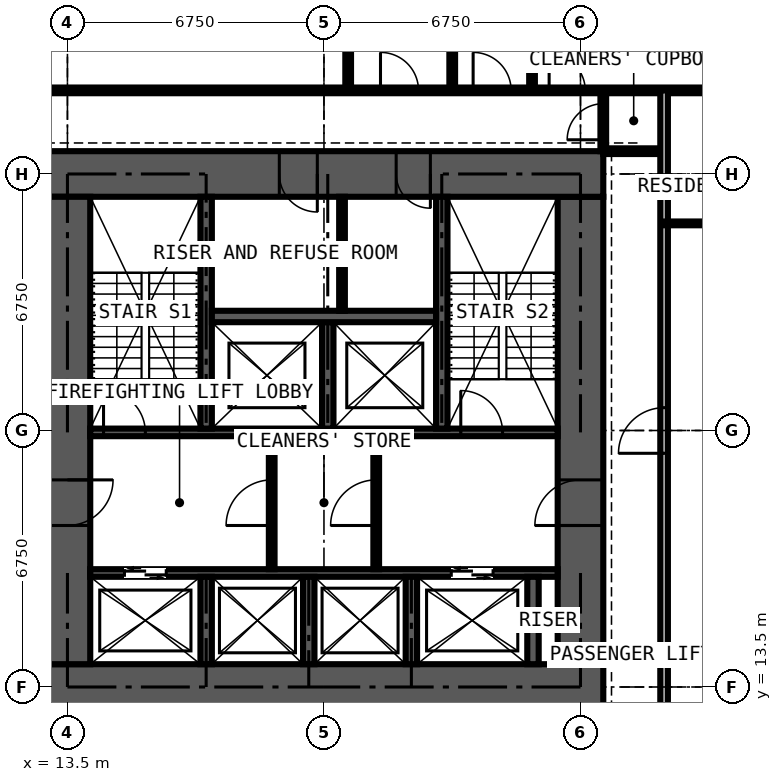
"""IFC4 building model, lengths in metres.
Left out: names, types, materials, properties, quantities, classifications, styles, units other than length and angle.
Written with IfcOpenShell. Run it as: python <this file> out.ifc"""

import sys

from ifc_helpers import new_model, si_unit, direction, frame, frame_2d, origin, place, context, subcontext, project, spatial, rectangle, extrude, element, fill, save


model = new_model("IFC4")
c1 = context("Model", 3, precision=1e-05, world=origin(), true_north=direction((0.0, 1.0)))
c2 = subcontext(c1, "Body", "Model", "MODEL_VIEW")
j1 = project(units=[si_unit("LENGTHUNIT", "METRE"), si_unit("PLANEANGLEUNIT", "RADIAN")], contexts=[c1])
p1 = place(None, origin())
s1 = spatial("IfcSite", under=j1, at=p1, CompositionType="ELEMENT")
p2 = place(p1, origin())
s2 = spatial("IfcBuilding", under=s1, at=p2, CompositionType="ELEMENT")
p3 = place(p2, frame((0.0, 0.0, 54.0)))
s3 = spatial("IfcBuildingStorey", under=s2, at=p3, CompositionType="ELEMENT", Elevation=54.0)
p4 = place(p3, frame((12.9, 13.5, 0.0), z_axis=(0.0, 0.0, 1.0), x_axis=(1.0, 0.0, 0.0)))
e1 = element("IfcWall", 1, at=p4, inside=s3, PredefinedType="SHEAR", context=c2, shape_type="SweptSolid", body=[
    extrude(rectangle(XDim=14.7, YDim=1.2, at=frame_2d((7.35, 0.0))), origin(), (0.0, 0.0, 1.0), 3.6),
])
p5 = place(p3, frame((27.0, 14.1, 0.0), z_axis=(0.0, 0.0, 1.0), x_axis=(0.0, 1.0, 0.0)))
e2 = element("IfcWall", 2, at=p5, inside=s3, PredefinedType="SHEAR", context=c2, shape_type="SweptSolid", body=[
    extrude(rectangle(XDim=12.3, YDim=1.2, at=frame_2d((6.15, 0.0))), origin(), (0.0, 0.0, 1.0), 3.6),
])
p6 = place(p5, frame((3.65, 0.0, 0.0)))
e3 = element("IfcOpeningElement", 3, at=p6, cuts=e2, PredefinedType="OPENING", context=c2, shape_type="SweptSolid", body=[
    extrude(rectangle(XDim=1.2, YDim=2.2, at=frame_2d((0.6, 1.1))), frame((0.0, 0.61, 0.0), z_axis=(0.0, -1.0, 0.0), x_axis=(1.0, 0.0, 0.0)), (0.0, 0.0, 1.0), 1.22),
])
p7 = place(p3, frame((27.6, 27.0, 0.0), z_axis=(0.0, 0.0, 1.0), x_axis=(-1.0, 0.0, 0.0)))
e4 = element("IfcWall", 4, at=p7, inside=s3, PredefinedType="SHEAR", context=c2, shape_type="SweptSolid", body=[
    extrude(rectangle(XDim=14.7, YDim=1.2, at=frame_2d((7.35, 0.0))), origin(), (0.0, 0.0, 1.0), 3.6),
])
p8 = place(p7, frame((4.55, 0.0, 0.0)))
e5 = element("IfcOpeningElement", 5, at=p8, cuts=e4, PredefinedType="OPENING", context=c2, shape_type="SweptSolid", body=[
    extrude(rectangle(XDim=0.9, YDim=2.2, at=frame_2d((0.45, 1.1))), frame((0.0, 0.61, 0.0), z_axis=(0.0, -1.0, 0.0), x_axis=(1.0, 0.0, 0.0)), (0.0, 0.0, 1.0), 1.22),
])
p9 = place(p7, frame((7.525, 0.0, 0.0)))
e6 = element("IfcOpeningElement", 6, at=p9, cuts=e4, PredefinedType="OPENING", context=c2, shape_type="SweptSolid", body=[
    extrude(rectangle(XDim=1.0, YDim=2.2, at=frame_2d((0.5, 1.1))), frame((0.0, 0.61, 0.0), z_axis=(0.0, -1.0, 0.0), x_axis=(1.0, 0.0, 0.0)), (0.0, 0.0, 1.0), 1.22),
])
p10 = place(p3, frame((13.5, 26.4, 0.0), z_axis=(0.0, 0.0, 1.0), x_axis=(0.0, -1.0, 0.0)))
e7 = element("IfcWall", 7, at=p10, inside=s3, PredefinedType="SHEAR", context=c2, shape_type="SweptSolid", body=[
    extrude(rectangle(XDim=12.3, YDim=1.2, at=frame_2d((6.15, 0.0))), origin(), (0.0, 0.0, 1.0), 3.6),
])
p11 = place(p10, frame((7.45, 0.0, 0.0)))
e8 = element("IfcOpeningElement", 8, at=p11, cuts=e7, PredefinedType="OPENING", context=c2, shape_type="SweptSolid", body=[
    extrude(rectangle(XDim=1.2, YDim=2.2, at=frame_2d((0.6, 1.1))), frame((0.0, 0.61, 0.0), z_axis=(0.0, -1.0, 0.0), x_axis=(1.0, 0.0, 0.0)), (0.0, 0.0, 1.0), 1.22),
])
p12 = place(p3, frame((14.1, 16.5, 0.0), z_axis=(0.0, 0.0, 1.0), x_axis=(1.0, 0.0, 0.0)))
e9 = element("IfcWall", 9, at=p12, inside=s3, PredefinedType="SHEAR", context=c2, shape_type="SweptSolid", body=[
    extrude(rectangle(XDim=12.3, YDim=0.2, at=frame_2d((6.15, 0.0))), origin(), (0.0, 0.0, 1.0), 3.6),
])
p13 = place(p12, frame((0.9, 0.0, 0.0)))
e10 = element("IfcOpeningElement", 10, at=p13, cuts=e9, PredefinedType="OPENING", context=c2, shape_type="SweptSolid", body=[
    extrude(rectangle(XDim=1.1, YDim=2.2, at=frame_2d((0.55, 1.1))), frame((0.0, 0.11, 0.0), z_axis=(0.0, -1.0, 0.0), x_axis=(1.0, 0.0, 0.0)), (0.0, 0.0, 1.0), 0.22),
])
p14 = place(p12, frame((9.5, 0.0, 0.0)))
e11 = element("IfcOpeningElement", 11, at=p14, cuts=e9, PredefinedType="OPENING", context=c2, shape_type="SweptSolid", body=[
    extrude(rectangle(XDim=1.1, YDim=2.2, at=frame_2d((0.55, 1.1))), frame((0.0, 0.11, 0.0), z_axis=(0.0, -1.0, 0.0), x_axis=(1.0, 0.0, 0.0)), (0.0, 0.0, 1.0), 0.22),
])
p15 = place(p3, frame((14.1, 20.2, 0.0), z_axis=(0.0, 0.0, 1.0), x_axis=(1.0, 0.0, 0.0)))
e12 = element("IfcWall", 12, at=p15, inside=s3, PredefinedType="SHEAR", context=c2, shape_type="SweptSolid", body=[
    extrude(rectangle(XDim=12.3, YDim=0.2, at=frame_2d((6.15, 0.0))), origin(), (0.0, 0.0, 1.0), 3.6),
])
p16 = place(p15, frame((0.35, 0.0, 0.0)))
e13 = element("IfcOpeningElement", 13, at=p16, cuts=e12, PredefinedType="OPENING", context=c2, shape_type="SweptSolid", body=[
    extrude(rectangle(XDim=1.1, YDim=2.2, at=frame_2d((0.55, 1.1))), frame((0.0, 0.11, 0.0), z_axis=(0.0, -1.0, 0.0), x_axis=(1.0, 0.0, 0.0)), (0.0, 0.0, 1.0), 0.22),
])
p17 = place(p15, frame((9.75, 0.0, 0.0)))
e14 = element("IfcOpeningElement", 14, at=p17, cuts=e12, PredefinedType="OPENING", context=c2, shape_type="SweptSolid", body=[
    extrude(rectangle(XDim=1.1, YDim=2.2, at=frame_2d((0.55, 1.1))), frame((0.0, 0.11, 0.0), z_axis=(0.0, -1.0, 0.0), x_axis=(1.0, 0.0, 0.0)), (0.0, 0.0, 1.0), 0.22),
])
for number, where, z_axis, x_axis in (
    (15, (17.15, 20.3, 0.0), (0.0, 0.0, 1.0), (0.0, 1.0, 0.0)),
    (16, (23.35, 20.3, 0.0), (0.0, 0.0, 1.0), (0.0, 1.0, 0.0)),
):
    element("IfcWall", number, at=place(p3, frame(where, z_axis=z_axis, x_axis=x_axis)), inside=s3, PredefinedType="SHEAR", context=c2, shape_type="SweptSolid", body=[
        extrude(rectangle(XDim=6.1, YDim=0.3, at=frame_2d((3.05, 0.0))), origin(), (0.0, 0.0, 1.0), 3.6),
    ])
p18 = place(p3, frame((20.35, 20.3, 0.0), z_axis=(0.0, 0.0, 1.0), x_axis=(0.0, 1.0, 0.0)))
e17 = element("IfcWall", 17, at=p18, inside=s3, PredefinedType="SHEAR", context=c2, shape_type="SweptSolid", body=[
    extrude(rectangle(XDim=2.8, YDim=0.3, at=frame_2d((1.4, 0.0))), origin(), (0.0, 0.0, 1.0), 3.6),
])
p19 = place(p3, frame((17.3, 23.25, 0.0), z_axis=(0.0, 0.0, 1.0), x_axis=(1.0, 0.0, 0.0)))
e18 = element("IfcWall", 18, at=p19, inside=s3, PredefinedType="SHEAR", context=c2, shape_type="SweptSolid", body=[
    extrude(rectangle(XDim=5.9, YDim=0.3, at=frame_2d((2.95, 0.0))), origin(), (0.0, 0.0, 1.0), 3.6),
])
for number, where, z_axis, x_axis in (
    (19, (17.15, 14.1, 0.0), (0.0, 0.0, 1.0), (0.0, 1.0, 0.0)),
    (20, (19.85, 14.1, 0.0), (0.0, 0.0, 1.0), (0.0, 1.0, 0.0)),
    (21, (22.55, 14.1, 0.0), (0.0, 0.0, 1.0), (0.0, 1.0, 0.0)),
    (22, (25.75, 14.1, 0.0), (0.0, 0.0, 1.0), (0.0, 1.0, 0.0)),
):
    element("IfcWall", number, at=place(p3, frame(where, z_axis=z_axis, x_axis=x_axis)), inside=s3, PredefinedType="SHEAR", context=c2, shape_type="SweptSolid", body=[
        extrude(rectangle(XDim=2.3, YDim=0.3, at=frame_2d((1.15, 0.0))), origin(), (0.0, 0.0, 1.0), 3.6),
    ])
p20 = place(p3, frame((18.875, 16.6, 0.0), z_axis=(0.0, 0.0, 1.0), x_axis=(0.0, 1.0, 0.0)))
e23 = element("IfcWall", 23, at=p20, inside=s3, PredefinedType="PARTITIONING", context=c2, shape_type="SweptSolid", body=[
    extrude(rectangle(XDim=3.5, YDim=0.15, at=frame_2d((1.75, 0.0))), origin(), (0.0, 0.0, 1.0), 3.375),
])
p21 = place(p20, frame((1.15, 0.0, 0.0)))
e24 = element("IfcOpeningElement", 24, at=p21, cuts=e23, PredefinedType="OPENING", context=c2, shape_type="SweptSolid", body=[
    extrude(rectangle(XDim=1.2, YDim=2.2, at=frame_2d((0.6, 1.1))), frame((0.0, 0.085, 0.0), z_axis=(0.0, -1.0, 0.0), x_axis=(1.0, 0.0, 0.0)), (0.0, 0.0, 1.0), 0.17),
])
p22 = place(p3, frame((21.625, 16.6, 0.0), z_axis=(0.0, 0.0, 1.0), x_axis=(0.0, 1.0, 0.0)))
e25 = element("IfcWall", 25, at=p22, inside=s3, PredefinedType="PARTITIONING", context=c2, shape_type="SweptSolid", body=[
    extrude(rectangle(XDim=3.5, YDim=0.15, at=frame_2d((1.75, 0.0))), origin(), (0.0, 0.0, 1.0), 3.375),
])
p23 = place(p22, frame((1.15, 0.0, 0.0)))
e26 = element("IfcOpeningElement", 26, at=p23, cuts=e25, PredefinedType="OPENING", context=c2, shape_type="SweptSolid", body=[
    extrude(rectangle(XDim=1.2, YDim=2.2, at=frame_2d((0.6, 1.1))), frame((0.0, 0.085, 0.0), z_axis=(0.0, -1.0, 0.0), x_axis=(1.0, 0.0, 0.0)), (0.0, 0.0, 1.0), 0.17),
])
p24 = place(p3, frame((20.725, 23.4, 0.0), z_axis=(0.0, 0.0, 1.0), x_axis=(0.0, 1.0, 0.0)))
e27 = element("IfcWall", 27, at=p24, inside=s3, PredefinedType="PARTITIONING", context=c2, shape_type="SweptSolid", body=[
    extrude(rectangle(XDim=3.0, YDim=0.15, at=frame_2d((1.5, 0.0))), origin(), (0.0, 0.0, 1.0), 3.375),
])
p25 = place(p3, frame((11.3, 29.2, 0.0), z_axis=(0.0, 0.0, 1.0), x_axis=(1.0, 0.0, 0.0)))
e28 = element("IfcWall", 28, at=p25, inside=s3, PredefinedType="PARTITIONING", context=c2, shape_type="SweptSolid", body=[
    extrude(rectangle(XDim=19.075, YDim=0.15, at=frame_2d((9.538, 0.0))), origin(), (0.0, 0.0, 1.0), 3.375),
])
p26 = place(p25, frame((12.875, 0.0, 0.0)))
e29 = element("IfcOpeningElement", 29, at=p26, cuts=e28, PredefinedType="OPENING", context=c2, shape_type="SweptSolid", body=[
    extrude(rectangle(XDim=1.0, YDim=2.2, at=frame_2d((0.5, 1.1))), frame((0.0, 0.085, 0.0), z_axis=(0.0, -1.0, 0.0), x_axis=(1.0, 0.0, 0.0)), (0.0, 0.0, 1.0), 0.17),
])
p27 = place(p25, frame((10.438, 0.0, 0.0)))
e30 = element("IfcOpeningElement", 30, at=p27, cuts=e28, PredefinedType="OPENING", context=c2, shape_type="SweptSolid", body=[
    extrude(rectangle(XDim=1.0, YDim=2.2, at=frame_2d((0.5, 1.1))), frame((0.0, 0.085, 0.0), z_axis=(0.0, -1.0, 0.0), x_axis=(1.0, 0.0, 0.0)), (0.0, 0.0, 1.0), 0.17),
])
p28 = place(p25, frame((14.875, 0.0, 0.0)))
e31 = element("IfcOpeningElement", 31, at=p28, cuts=e28, PredefinedType="OPENING", context=c2, shape_type="SweptSolid", body=[
    extrude(rectangle(XDim=0.95, YDim=2.2, at=frame_2d((0.475, 1.1))), frame((0.0, 0.085, 0.0), z_axis=(0.0, -1.0, 0.0), x_axis=(1.0, 0.0, 0.0)), (0.0, 0.0, 1.0), 0.17),
])
p29 = place(p3, frame((20.887, 29.2, 0.0), z_axis=(0.0, 0.0, 1.0), x_axis=(0.0, 1.0, 0.0)))
e32 = element("IfcWall", 32, at=p29, inside=s3, PredefinedType="PARTITIONING", context=c2, shape_type="SweptSolid", body=[
    extrude(rectangle(XDim=5.65, YDim=0.15, at=frame_2d((2.825, 0.0))), origin(), (0.0, 0.0, 1.0), 3.375),
])
p30 = place(p3, frame((23.625, 29.2, 0.0), z_axis=(0.0, 0.0, 1.0), x_axis=(0.0, 1.0, 0.0)))
e33 = element("IfcWall", 33, at=p30, inside=s3, PredefinedType="PARTITIONING", context=c2, shape_type="SweptSolid", body=[
    extrude(rectangle(XDim=12.034, YDim=0.15, at=frame_2d((6.017, 0.0))), origin(), (0.0, 0.0, 1.0), 3.375),
])
p31 = place(p3, frame((25.725, 29.2, 0.0), z_axis=(0.0, 0.0, 1.0), x_axis=(0.0, 1.0, 0.0)))
e34 = element("IfcWall", 34, at=p31, inside=s3, PredefinedType="PARTITIONING", context=c2, shape_type="SweptSolid", body=[
    extrude(rectangle(XDim=5.65, YDim=0.15, at=frame_2d((2.825, 0.0))), origin(), (0.0, 0.0, 1.0), 3.375),
])
p32 = place(p3, frame((27.6, 27.6, 0.0), z_axis=(0.0, 0.0, 1.0), x_axis=(0.0, 1.0, 0.0)))
e35 = element("IfcWall", 35, at=p32, inside=s3, PredefinedType="PARTITIONING", context=c2, shape_type="SweptSolid", body=[
    extrude(rectangle(XDim=1.6, YDim=0.15, at=frame_2d((0.8, 0.0))), origin(), (0.0, 0.0, 1.0), 3.375),
])
p33 = place(p32, frame((0.3, 0.0, 0.0)))
e36 = element("IfcOpeningElement", 36, at=p33, cuts=e35, PredefinedType="OPENING", context=c2, shape_type="SweptSolid", body=[
    extrude(rectangle(XDim=0.95, YDim=2.2, at=frame_2d((0.475, 1.1))), frame((0.0, 0.085, 0.0), z_axis=(0.0, -1.0, 0.0), x_axis=(1.0, 0.0, 0.0)), (0.0, 0.0, 1.0), 0.17),
])
p34 = place(p3, frame((27.6, 27.6, 0.0), z_axis=(0.0, 0.0, 1.0), x_axis=(1.0, 0.0, 0.0)))
e37 = element("IfcWall", 37, at=p34, inside=s3, PredefinedType="PARTITIONING", context=c2, shape_type="SweptSolid", body=[
    extrude(rectangle(XDim=1.6, YDim=0.15, at=frame_2d((0.8, 0.0))), origin(), (0.0, 0.0, 1.0), 2.877),
])
p35 = place(p3, frame((29.2, 11.3, 0.0), z_axis=(0.0, 0.0, 1.0), x_axis=(0.0, 1.0, 0.0)))
e38 = element("IfcWall", 38, at=p35, inside=s3, PredefinedType="PARTITIONING", context=c2, shape_type="SweptSolid", body=[
    extrude(rectangle(XDim=17.9, YDim=0.2, at=frame_2d((8.95, 0.0))), origin(), (0.0, 0.0, 1.0), 3.375),
])
p36 = place(p35, frame((8.35, 0.0, 0.0)))
e39 = element("IfcOpeningElement", 39, at=p36, cuts=e38, PredefinedType="OPENING", context=c2, shape_type="SweptSolid", body=[
    extrude(rectangle(XDim=1.2, YDim=2.2, at=frame_2d((0.6, 1.1))), frame((0.0, 0.11, 0.0), z_axis=(0.0, -1.0, 0.0), x_axis=(1.0, 0.0, 0.0)), (0.0, 0.0, 1.0), 0.22),
])
p37 = place(p3, frame((29.2, 25.7, 0.0), z_axis=(0.0, 0.0, 1.0), x_axis=(1.0, 0.0, 0.0)))
e40 = element("IfcWall", 40, at=p37, inside=s3, PredefinedType="SHEAR", context=c2, shape_type="SweptSolid", body=[
    extrude(rectangle(XDim=3.45, YDim=0.1, at=frame_2d((1.725, 0.0))), origin(), (0.0, 0.0, 1.0), 3.375),
])
p38 = place(p13, origin())
e41 = element("IfcDoor", 41, at=p38, inside=s3, OperationType="DOUBLE_DOOR_SLIDING", PredefinedType="DOOR", context=c2, shape_type="SweptSolid", body=[
    extrude(rectangle(XDim=1.1, YDim=2.2, at=frame_2d((0.55, 1.1))), frame((0.0, 0.025, 0.0), z_axis=(0.0, -1.0, 0.0), x_axis=(1.0, 0.0, 0.0)), (0.0, 0.0, 1.0), 0.05),
])
fill(e10, e41)
p39 = place(p14, origin())
e42 = element("IfcDoor", 42, at=p39, inside=s3, OperationType="DOUBLE_DOOR_SLIDING", PredefinedType="DOOR", context=c2, shape_type="SweptSolid", body=[
    extrude(rectangle(XDim=1.1, YDim=2.2, at=frame_2d((0.55, 1.1))), frame((0.0, 0.025, 0.0), z_axis=(0.0, -1.0, 0.0), x_axis=(1.0, 0.0, 0.0)), (0.0, 0.0, 1.0), 0.05),
])
fill(e11, e42)
p40 = place(p11, origin())
e43 = element("IfcDoor", 43, at=p40, inside=s3, OperationType="DOUBLE_DOOR_SINGLE_SWING", PredefinedType="DOOR", context=c2, shape_type="SweptSolid", body=[
    extrude(rectangle(XDim=1.2, YDim=2.2, at=frame_2d((0.6, 1.1))), frame((0.0, 0.025, 0.0), z_axis=(0.0, -1.0, 0.0), x_axis=(1.0, 0.0, 0.0)), (0.0, 0.0, 1.0), 0.05),
])
fill(e8, e43)
p41 = place(p6, origin())
e44 = element("IfcDoor", 44, at=p41, inside=s3, OperationType="DOUBLE_DOOR_SINGLE_SWING", PredefinedType="DOOR", context=c2, shape_type="SweptSolid", body=[
    extrude(rectangle(XDim=1.2, YDim=2.2, at=frame_2d((0.6, 1.1))), frame((0.0, 0.025, 0.0), z_axis=(0.0, -1.0, 0.0), x_axis=(1.0, 0.0, 0.0)), (0.0, 0.0, 1.0), 0.05),
])
fill(e3, e44)
p42 = place(p21, origin())
e45 = element("IfcDoor", 45, at=p42, inside=s3, OperationType="DOUBLE_DOOR_SINGLE_SWING", PredefinedType="DOOR", context=c2, shape_type="SweptSolid", body=[
    extrude(rectangle(XDim=1.2, YDim=2.2, at=frame_2d((0.6, 1.1))), frame((0.0, 0.025, 0.0), z_axis=(0.0, -1.0, 0.0), x_axis=(1.0, 0.0, 0.0)), (0.0, 0.0, 1.0), 0.05),
])
fill(e24, e45)
p43 = place(p23, origin())
e46 = element("IfcDoor", 46, at=p43, inside=s3, OperationType="DOUBLE_DOOR_SINGLE_SWING", PredefinedType="DOOR", context=c2, shape_type="SweptSolid", body=[
    extrude(rectangle(XDim=1.2, YDim=2.2, at=frame_2d((0.6, 1.1))), frame((0.0, 0.025, 0.0), z_axis=(0.0, -1.0, 0.0), x_axis=(1.0, 0.0, 0.0)), (0.0, 0.0, 1.0), 0.05),
])
fill(e26, e46)
p44 = place(p8, origin())
e47 = element("IfcDoor", 47, at=p44, inside=s3, OperationType="SINGLE_SWING_LEFT", PredefinedType="DOOR", context=c2, shape_type="SweptSolid", body=[
    extrude(rectangle(XDim=0.9, YDim=2.2, at=frame_2d((0.45, 1.1))), frame((0.0, 0.4, 0.0), z_axis=(0.0, -1.0, 0.0), x_axis=(1.0, 0.0, 0.0)), (0.0, 0.0, 1.0), 0.8),
])
fill(e5, e47)
p45 = place(p9, origin())
e48 = element("IfcDoor", 48, at=p45, inside=s3, OperationType="SINGLE_SWING_LEFT", PredefinedType="DOOR", context=c2, shape_type="SweptSolid", body=[
    extrude(rectangle(XDim=1.0, YDim=2.2, at=frame_2d((0.5, 1.1))), frame((0.0, 0.025, 0.0), z_axis=(0.0, -1.0, 0.0), x_axis=(1.0, 0.0, 0.0)), (0.0, 0.0, 1.0), 0.05),
])
fill(e6, e48)
p46 = place(p16, origin())
e49 = element("IfcDoor", 49, at=p46, inside=s3, OperationType="SINGLE_SWING_LEFT", PredefinedType="DOOR", context=c2, shape_type="SweptSolid", body=[
    extrude(rectangle(XDim=1.1, YDim=2.2, at=frame_2d((0.55, 1.1))), frame((0.0, 0.025, 0.0), z_axis=(0.0, -1.0, 0.0), x_axis=(1.0, 0.0, 0.0)), (0.0, 0.0, 1.0), 0.05),
])
fill(e13, e49)
p47 = place(p17, origin())
e50 = element("IfcDoor", 50, at=p47, inside=s3, OperationType="SINGLE_SWING_LEFT", PredefinedType="DOOR", context=c2, shape_type="SweptSolid", body=[
    extrude(rectangle(XDim=1.1, YDim=2.2, at=frame_2d((0.55, 1.1))), frame((0.0, 0.025, 0.0), z_axis=(0.0, -1.0, 0.0), x_axis=(1.0, 0.0, 0.0)), (0.0, 0.0, 1.0), 0.05),
])
fill(e14, e50)
p48 = place(p33, origin())
e51 = element("IfcDoor", 51, at=p48, inside=s3, OperationType="SINGLE_SWING_LEFT", PredefinedType="DOOR", context=c2, shape_type="SweptSolid", body=[
    extrude(rectangle(XDim=0.95, YDim=2.2, at=frame_2d((0.475, 1.1))), frame((0.0, 0.025, 0.0), z_axis=(0.0, -1.0, 0.0), x_axis=(1.0, 0.0, 0.0)), (0.0, 0.0, 1.0), 0.05),
])
fill(e36, e51)
p49 = place(p26, origin())
e52 = element("IfcDoor", 52, at=p49, inside=s3, OperationType="SINGLE_SWING_LEFT", PredefinedType="DOOR", context=c2, shape_type="SweptSolid", body=[
    extrude(rectangle(XDim=1.0, YDim=2.2, at=frame_2d((0.5, 1.1))), frame((0.0, 0.025, 0.0), z_axis=(0.0, -1.0, 0.0), x_axis=(1.0, 0.0, 0.0)), (0.0, 0.0, 1.0), 0.05),
])
fill(e29, e52)
p50 = place(p27, origin())
e53 = element("IfcDoor", 53, at=p50, inside=s3, OperationType="SINGLE_SWING_LEFT", PredefinedType="DOOR", context=c2, shape_type="SweptSolid", body=[
    extrude(rectangle(XDim=1.0, YDim=2.2, at=frame_2d((0.5, 1.1))), frame((0.0, 0.025, 0.0), z_axis=(0.0, -1.0, 0.0), x_axis=(1.0, 0.0, 0.0)), (0.0, 0.0, 1.0), 0.05),
])
fill(e30, e53)
p51 = place(p28, origin())
e54 = element("IfcDoor", 54, at=p51, inside=s3, OperationType="SINGLE_SWING_LEFT", PredefinedType="DOOR", context=c2, shape_type="SweptSolid", body=[
    extrude(rectangle(XDim=0.95, YDim=2.2, at=frame_2d((0.475, 1.1))), frame((0.0, 0.025, 0.0), z_axis=(0.0, -1.0, 0.0), x_axis=(1.0, 0.0, 0.0)), (0.0, 0.0, 1.0), 0.05),
])
fill(e31, e54)
p52 = place(p36, origin())
e55 = element("IfcDoor", 55, at=p52, inside=s3, OperationType="DOUBLE_DOOR_SINGLE_SWING", PredefinedType="DOOR", context=c2, shape_type="SweptSolid", body=[
    extrude(rectangle(XDim=1.2, YDim=2.2, at=frame_2d((0.6, 1.1))), frame((0.0, 0.025, 0.0), z_axis=(0.0, -1.0, 0.0), x_axis=(1.0, 0.0, 0.0)), (0.0, 0.0, 1.0), 0.05),
])
fill(e39, e55)
save(model, sys.argv[1])
